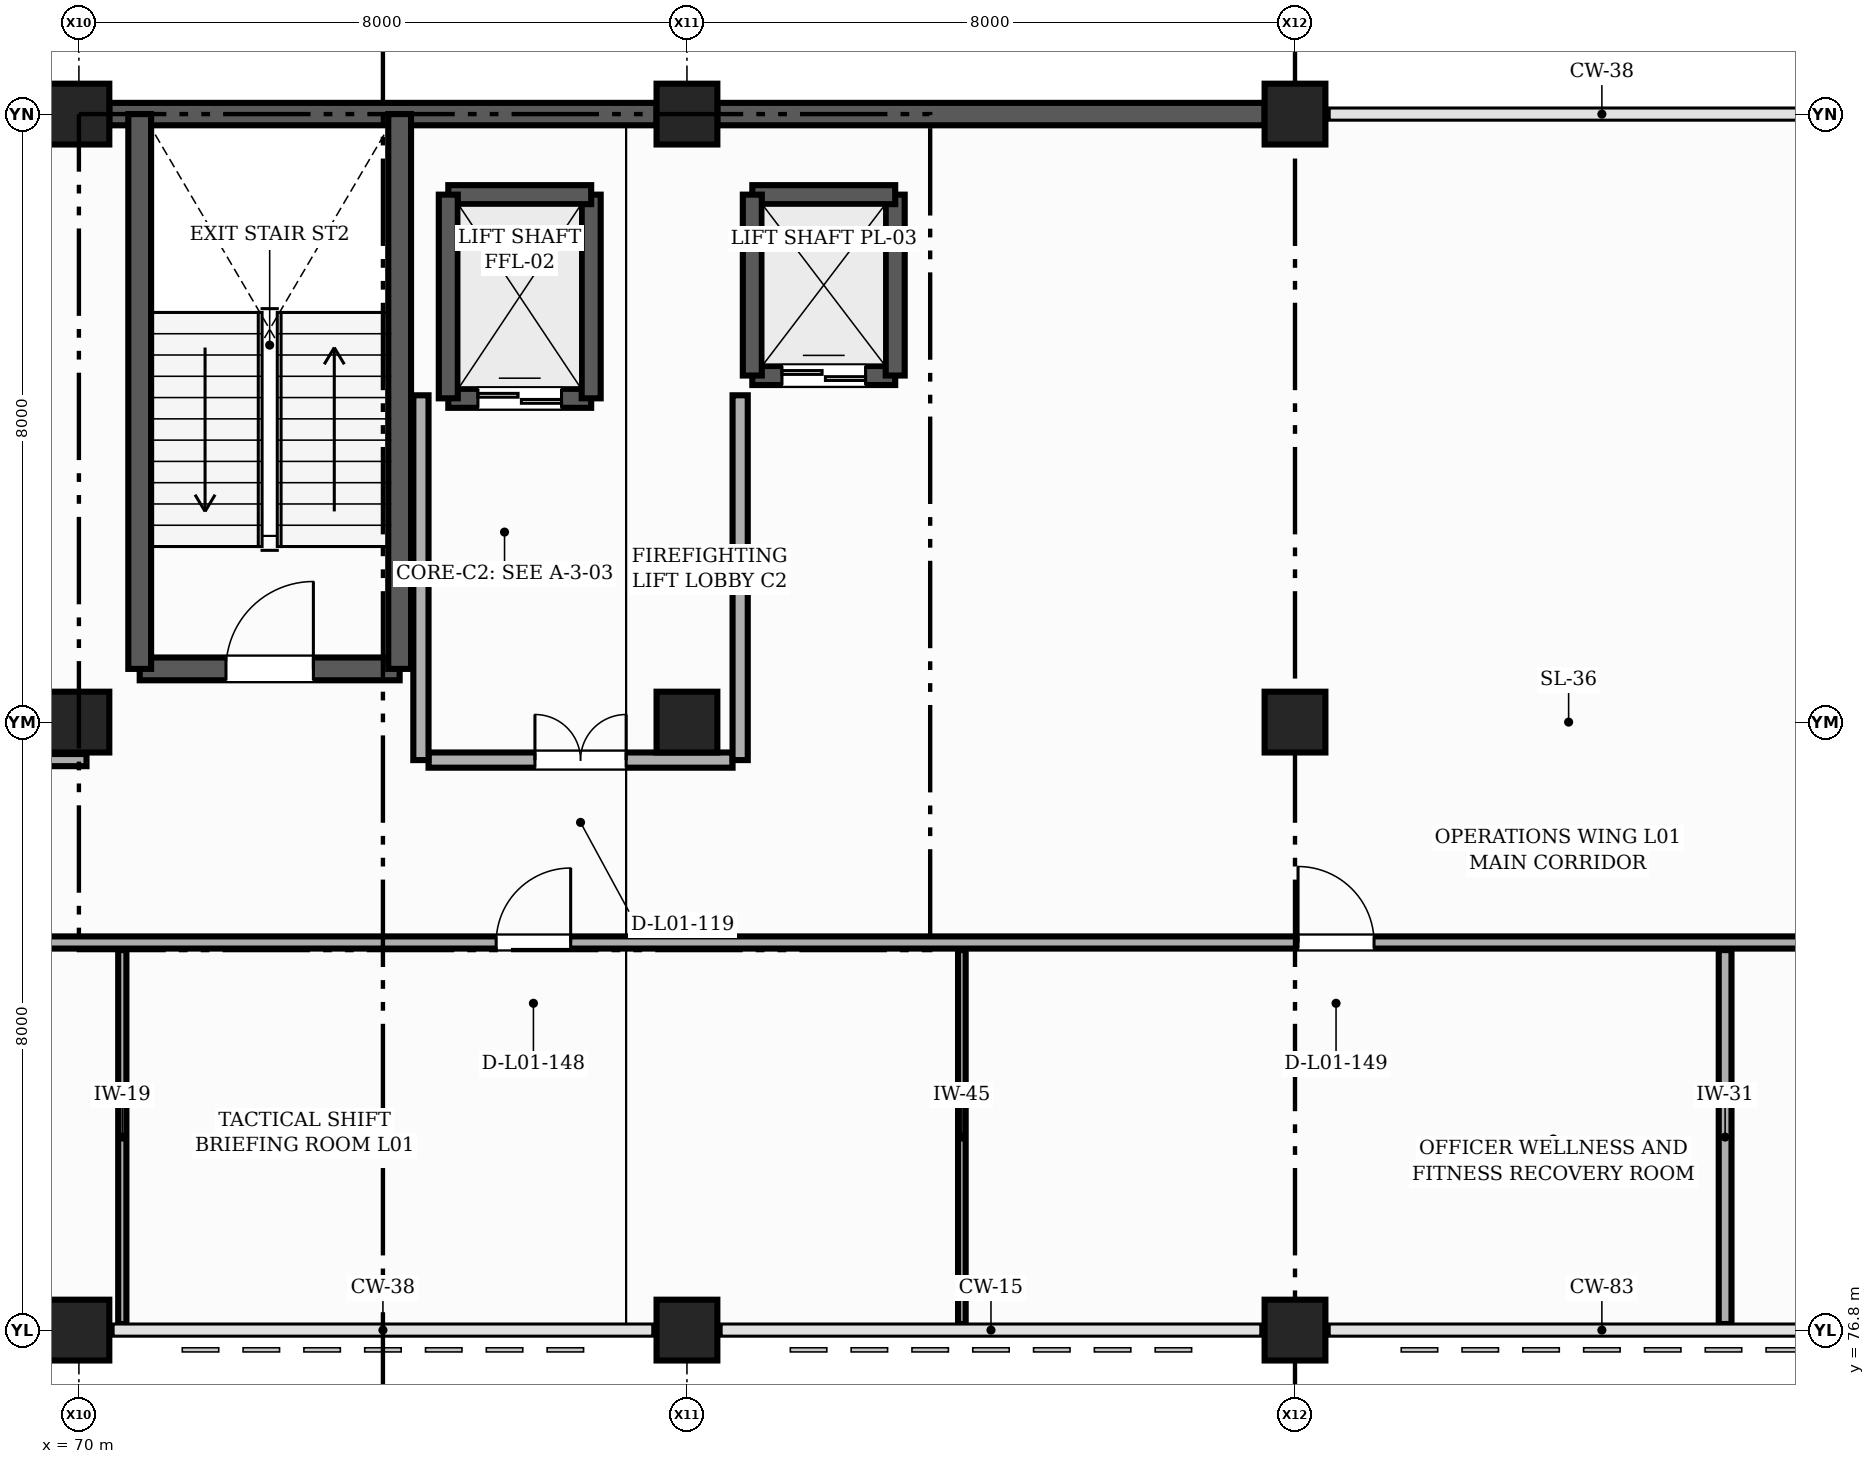
"""IFC4 building model, lengths in metres.
Left out: names, types, materials, properties, quantities, classifications, styles, units other than length and angle.
Written with IfcOpenShell. Run it as: python <this file> out.ifc"""

import sys

from ifc_helpers import new_model, si_unit, direction, frame, frame_2d, origin, origin_2d, place, context, subcontext, project, spatial, rectangle, extrude, element, fill, save


model = new_model("IFC4")
c1 = context("Model", 3, precision=1e-05, world=origin(), true_north=direction((0.0, 1.0)))
c2 = subcontext(c1, "Body", "Model", "MODEL_VIEW")
j1 = project(units=[si_unit("LENGTHUNIT", "METRE"), si_unit("PLANEANGLEUNIT", "RADIAN")], contexts=[c1])
p1 = place(None, origin())
s1 = spatial("IfcSite", under=j1, at=p1, CompositionType="ELEMENT")
p2 = place(p1, origin())
s2 = spatial("IfcBuilding", under=s1, at=p2, CompositionType="ELEMENT")
p3 = place(p2, frame((0.0, 0.0, 4.8)))
s3 = spatial("IfcBuildingStorey", under=s2, at=p3, CompositionType="ELEMENT", Elevation=4.8)
for number, where, z_axis, x_axis in (
    (1, (70.0, 76.8, 0.0), (0.0, 0.0, 1.0), (1.0, 0.0, 0.0)),
    (2, (70.0, 84.8, 0.0), (0.0, 0.0, 1.0), (1.0, 0.0, 0.0)),
    (3, (70.0, 92.8, 0.0), (0.0, 0.0, 1.0), (1.0, 0.0, 0.0)),
    (4, (78.0, 76.8, 0.0), (0.0, 0.0, 1.0), (1.0, 0.0, 0.0)),
    (5, (78.0, 84.8, 0.0), (0.0, 0.0, 1.0), (1.0, 0.0, 0.0)),
    (6, (78.0, 92.8, 0.0), (0.0, 0.0, 1.0), (1.0, 0.0, 0.0)),
    (7, (86.0, 76.8, 0.0), (0.0, 0.0, 1.0), (1.0, 0.0, 0.0)),
    (8, (86.0, 84.8, 0.0), (0.0, 0.0, 1.0), (1.0, 0.0, 0.0)),
    (9, (86.0, 92.8, 0.0), (0.0, 0.0, 1.0), (1.0, 0.0, 0.0)),
):
    element("IfcColumn", number, at=place(p3, frame(where, z_axis=z_axis, x_axis=x_axis)), inside=s3, PredefinedType="COLUMN", context=c2, shape_type="SweptSolid", body=[
        extrude(rectangle(XDim=0.8, YDim=0.8, at=origin_2d()), origin(), (0.0, 0.0, 1.0), 4.2),
    ])
p4 = place(p3, frame((85.6, 92.8, 0.0), z_axis=(0.0, 0.0, 1.0), x_axis=(-1.0, 0.0, 0.0)))
e10 = element("IfcWall", 10, at=p4, inside=s3, PredefinedType="SOLIDWALL", context=c2, shape_type="SweptSolid", body=[
    extrude(rectangle(XDim=7.2, YDim=0.295, at=frame_2d((3.6, 0.0))), origin(), (0.0, 0.0, 1.0), 3.16),
])
p5 = place(p3, frame((77.6, 92.8, 0.0), z_axis=(0.0, 0.0, 1.0), x_axis=(-1.0, 0.0, 0.0)))
e11 = element("IfcWall", 11, at=p5, inside=s3, PredefinedType="SOLIDWALL", context=c2, shape_type="SweptSolid", body=[
    extrude(rectangle(XDim=7.2, YDim=0.295, at=frame_2d((3.6, 0.0))), origin(), (0.0, 0.0, 1.0), 3.91),
])
p6 = place(p3, frame((70.8, 85.5, 0.0), z_axis=(0.0, 0.0, 1.0), x_axis=(1.0, 0.0, 0.0)))
e12 = element("IfcWall", 12, at=p6, inside=s3, PredefinedType="SHEAR", context=c2, shape_type="SweptSolid", body=[
    extrude(rectangle(XDim=3.42, YDim=0.3, at=frame_2d((1.71, 0.0))), origin(), (0.0, 0.0, 1.0), 4.2),
])
p7 = place(p6, frame((1.135, 0.0, 0.0)))
e13 = element("IfcOpeningElement", 13, at=p7, cuts=e12, PredefinedType="OPENING", context=c2, shape_type="SweptSolid", body=[
    extrude(rectangle(XDim=1.15, YDim=2.15, at=frame_2d((0.575, 1.075))), frame((0.0, 0.16, 0.0), z_axis=(0.0, -1.0, 0.0), x_axis=(1.0, 0.0, 0.0)), (0.0, 0.0, 1.0), 0.32),
])
for number, where, z_axis, x_axis in (
    (14, (74.22, 85.5, 0.0), (0.0, 0.0, 1.0), (0.0, 1.0, 0.0)),
    (15, (70.8, 92.8, 0.0), (0.0, 0.0, 1.0), (0.0, -1.0, 0.0)),
):
    element("IfcWall", number, at=place(p3, frame(where, z_axis=z_axis, x_axis=x_axis)), inside=s3, PredefinedType="SHEAR", context=c2, shape_type="SweptSolid", body=[
        extrude(rectangle(XDim=7.3, YDim=0.3, at=frame_2d((3.65, 0.0))), origin(), (0.0, 0.0, 1.0), 4.2),
    ])
p8 = place(p3, frame((74.86, 89.06, 0.0), z_axis=(0.0, 0.0, 1.0), x_axis=(1.0, 0.0, 0.0)))
e16 = element("IfcWall", 16, at=p8, inside=s3, PredefinedType="SHEAR", context=c2, shape_type="SweptSolid", body=[
    extrude(rectangle(XDim=1.88, YDim=0.25, at=frame_2d((0.94, 0.0))), origin(), (0.0, 0.0, 1.0), 4.2),
])
p9 = place(p8, frame((0.39, 0.0, 0.0)))
e17 = element("IfcOpeningElement", 17, at=p9, cuts=e16, PredefinedType="OPENING", context=c2, shape_type="SweptSolid", body=[
    extrude(rectangle(XDim=1.1, YDim=2.2, at=frame_2d((0.55, 1.1))), frame((0.0, 0.135, 0.0), z_axis=(0.0, -1.0, 0.0), x_axis=(1.0, 0.0, 0.0)), (0.0, 0.0, 1.0), 0.27),
])
p10 = place(p3, frame((76.74, 89.06, 0.0), z_axis=(0.0, 0.0, 1.0), x_axis=(0.0, 1.0, 0.0)))
e18 = element("IfcWall", 18, at=p10, inside=s3, PredefinedType="SHEAR", context=c2, shape_type="SweptSolid", body=[
    extrude(rectangle(XDim=2.68, YDim=0.25, at=frame_2d((1.34, 0.0))), origin(), (0.0, 0.0, 1.0), 4.2),
])
p11 = place(p3, frame((76.74, 91.74, 0.0), z_axis=(0.0, 0.0, 1.0), x_axis=(-1.0, 0.0, 0.0)))
e19 = element("IfcWall", 19, at=p11, inside=s3, PredefinedType="SHEAR", context=c2, shape_type="SweptSolid", body=[
    extrude(rectangle(XDim=1.88, YDim=0.25, at=frame_2d((0.94, 0.0))), origin(), (0.0, 0.0, 1.0), 4.2),
])
p12 = place(p3, frame((74.86, 91.74, 0.0), z_axis=(0.0, 0.0, 1.0), x_axis=(0.0, -1.0, 0.0)))
e20 = element("IfcWall", 20, at=p12, inside=s3, PredefinedType="SHEAR", context=c2, shape_type="SweptSolid", body=[
    extrude(rectangle(XDim=2.68, YDim=0.25, at=frame_2d((1.34, 0.0))), origin(), (0.0, 0.0, 1.0), 4.2),
])
p13 = place(p3, frame((78.86, 89.36, 0.0), z_axis=(0.0, 0.0, 1.0), x_axis=(1.0, 0.0, 0.0)))
e21 = element("IfcWall", 21, at=p13, inside=s3, PredefinedType="SHEAR", context=c2, shape_type="SweptSolid", body=[
    extrude(rectangle(XDim=1.88, YDim=0.25, at=frame_2d((0.94, 0.0))), origin(), (0.0, 0.0, 1.0), 4.2),
])
p14 = place(p13, frame((0.39, 0.0, 0.0)))
e22 = element("IfcOpeningElement", 22, at=p14, cuts=e21, PredefinedType="OPENING", context=c2, shape_type="SweptSolid", body=[
    extrude(rectangle(XDim=1.1, YDim=2.2, at=frame_2d((0.55, 1.1))), frame((0.0, 0.135, 0.0), z_axis=(0.0, -1.0, 0.0), x_axis=(1.0, 0.0, 0.0)), (0.0, 0.0, 1.0), 0.27),
])
p15 = place(p3, frame((80.74, 89.36, 0.0), z_axis=(0.0, 0.0, 1.0), x_axis=(0.0, 1.0, 0.0)))
e23 = element("IfcWall", 23, at=p15, inside=s3, PredefinedType="SHEAR", context=c2, shape_type="SweptSolid", body=[
    extrude(rectangle(XDim=2.38, YDim=0.25, at=frame_2d((1.19, 0.0))), origin(), (0.0, 0.0, 1.0), 4.2),
])
p16 = place(p3, frame((80.74, 91.74, 0.0), z_axis=(0.0, 0.0, 1.0), x_axis=(-1.0, 0.0, 0.0)))
e24 = element("IfcWall", 24, at=p16, inside=s3, PredefinedType="SHEAR", context=c2, shape_type="SweptSolid", body=[
    extrude(rectangle(XDim=1.88, YDim=0.25, at=frame_2d((0.94, 0.0))), origin(), (0.0, 0.0, 1.0), 4.2),
])
p17 = place(p3, frame((78.86, 91.74, 0.0), z_axis=(0.0, 0.0, 1.0), x_axis=(0.0, -1.0, 0.0)))
e25 = element("IfcWall", 25, at=p17, inside=s3, PredefinedType="SHEAR", context=c2, shape_type="SweptSolid", body=[
    extrude(rectangle(XDim=2.38, YDim=0.25, at=frame_2d((1.19, 0.0))), origin(), (0.0, 0.0, 1.0), 4.2),
])
p18 = place(p3, frame((74.6, 84.3, 0.0), z_axis=(0.0, 0.0, 1.0), x_axis=(1.0, 0.0, 0.0)))
e26 = element("IfcWall", 26, at=p18, inside=s3, PredefinedType="PARTITIONING", context=c2, shape_type="SweptSolid", body=[
    extrude(rectangle(XDim=4.0, YDim=0.2, at=frame_2d((2.0, 0.0))), origin(), (0.0, 0.0, 1.0), 3.195),
])
p19 = place(p18, frame((1.4, 0.0, 0.0)))
e27 = element("IfcOpeningElement", 27, at=p19, cuts=e26, PredefinedType="OPENING", context=c2, shape_type="SweptSolid", body=[
    extrude(rectangle(XDim=1.2, YDim=2.15, at=frame_2d((0.6, 1.075))), frame((0.0, 0.11, 0.0), z_axis=(0.0, -1.0, 0.0), x_axis=(1.0, 0.0, 0.0)), (0.0, 0.0, 1.0), 0.22),
])
p20 = place(p3, frame((74.5, 84.3, 0.0), z_axis=(0.0, 0.0, 1.0), x_axis=(0.0, 1.0, 0.0)))
e28 = element("IfcWall", 28, at=p20, inside=s3, PredefinedType="PARTITIONING", context=c2, shape_type="SweptSolid", body=[
    extrude(rectangle(XDim=4.8, YDim=0.2, at=frame_2d((2.4, 0.0))), origin(), (0.0, 0.0, 1.0), 3.345),
])
p21 = place(p3, frame((78.7, 84.3, 0.0), z_axis=(0.0, 0.0, 1.0), x_axis=(0.0, 1.0, 0.0)))
e29 = element("IfcWall", 29, at=p21, inside=s3, PredefinedType="PARTITIONING", context=c2, shape_type="SweptSolid", body=[
    extrude(rectangle(XDim=4.8, YDim=0.2, at=frame_2d((2.4, 0.0))), origin(), (0.0, 0.0, 1.0), 3.045),
])
p22 = place(p3, frame((70.571, 76.88, 0.0), z_axis=(0.0, 0.0, 1.0), x_axis=(0.0, 1.0, 0.0)))
e30 = element("IfcWall", 30, at=p22, inside=s3, PredefinedType="PARTITIONING", context=c2, shape_type="SweptSolid", body=[
    extrude(rectangle(XDim=4.92, YDim=0.108, at=frame_2d((2.46, 0.0))), origin(), (0.0, 0.0, 1.0), 3.145),
])
p23 = place(p3, frame((81.617, 76.88, 0.0), z_axis=(0.0, 0.0, 1.0), x_axis=(0.0, 1.0, 0.0)))
e31 = element("IfcWall", 31, at=p23, inside=s3, PredefinedType="PARTITIONING", context=c2, shape_type="SweptSolid", body=[
    extrude(rectangle(XDim=4.92, YDim=0.1, at=frame_2d((2.46, 0.0))), origin(), (0.0, 0.0, 1.0), 3.145),
])
p24 = place(p3, frame((91.659, 76.88, 0.0), z_axis=(0.0, 0.0, 1.0), x_axis=(0.0, 1.0, 0.0)))
e32 = element("IfcWall", 32, at=p24, inside=s3, PredefinedType="PARTITIONING", context=c2, shape_type="SweptSolid", body=[
    extrude(rectangle(XDim=4.92, YDim=0.168, at=frame_2d((2.46, 0.0))), origin(), (0.0, 0.0, 1.0), 3.145),
])
p25 = place(p3, frame((29.3, 81.9, 0.0), z_axis=(0.0, 0.0, 1.0), x_axis=(1.0, 0.0, 0.0)))
e33 = element("IfcWall", 33, at=p25, inside=s3, PredefinedType="PARTITIONING", context=c2, shape_type="SweptSolid", body=[
    extrude(rectangle(XDim=72.62, YDim=0.16, at=frame_2d((36.31, 0.0))), origin(), (0.0, 0.0, 1.0), 3.195),
])
p26 = place(p25, frame((7.49, 0.0, 0.0)))
e34 = element("IfcOpeningElement", 34, at=p26, cuts=e33, PredefinedType="OPENING", context=c2, shape_type="SweptSolid", body=[
    extrude(rectangle(XDim=0.9, YDim=2.1, at=frame_2d((0.45, 1.05))), frame((0.0, 0.09, 0.0), z_axis=(0.0, -1.0, 0.0), x_axis=(1.0, 0.0, 0.0)), (0.0, 0.0, 1.0), 0.18),
])
p27 = place(p25, frame((22.09, 0.0, 0.0)))
e35 = element("IfcOpeningElement", 35, at=p27, cuts=e33, PredefinedType="OPENING", context=c2, shape_type="SweptSolid", body=[
    extrude(rectangle(XDim=0.92, YDim=2.1, at=frame_2d((0.46, 1.05))), frame((0.0, 0.09, 0.0), z_axis=(0.0, -1.0, 0.0), x_axis=(1.0, 0.0, 0.0)), (0.0, 0.0, 1.0), 0.18),
])
p28 = place(p25, frame((34.65, 0.0, 0.0)))
e36 = element("IfcOpeningElement", 36, at=p28, cuts=e33, PredefinedType="OPENING", context=c2, shape_type="SweptSolid", body=[
    extrude(rectangle(XDim=0.95, YDim=2.1, at=frame_2d((0.475, 1.05))), frame((0.0, 0.09, 0.0), z_axis=(0.0, -1.0, 0.0), x_axis=(1.0, 0.0, 0.0)), (0.0, 0.0, 1.0), 0.18),
])
p29 = place(p25, frame((46.19, 0.0, 0.0)))
e37 = element("IfcOpeningElement", 37, at=p29, cuts=e33, PredefinedType="OPENING", context=c2, shape_type="SweptSolid", body=[
    extrude(rectangle(XDim=0.98, YDim=2.12, at=frame_2d((0.49, 1.06))), frame((0.0, 0.09, 0.0), z_axis=(0.0, -1.0, 0.0), x_axis=(1.0, 0.0, 0.0)), (0.0, 0.0, 1.0), 0.18),
])
p30 = place(p25, frame((56.74, 0.0, 0.0)))
e38 = element("IfcOpeningElement", 38, at=p30, cuts=e33, PredefinedType="OPENING", context=c2, shape_type="SweptSolid", body=[
    extrude(rectangle(XDim=1.0, YDim=2.1, at=frame_2d((0.5, 1.05))), frame((0.0, 0.09, 0.0), z_axis=(0.0, -1.0, 0.0), x_axis=(1.0, 0.0, 0.0)), (0.0, 0.0, 1.0), 0.18),
])
p31 = place(p25, frame((66.82, 0.0, 0.0)))
e39 = element("IfcOpeningElement", 39, at=p31, cuts=e33, PredefinedType="OPENING", context=c2, shape_type="SweptSolid", body=[
    extrude(rectangle(XDim=1.02, YDim=2.12, at=frame_2d((0.51, 1.06))), frame((0.0, 0.09, 0.0), z_axis=(0.0, -1.0, 0.0), x_axis=(1.0, 0.0, 0.0)), (0.0, 0.0, 1.0), 0.18),
])
p32 = place(p3, frame((34.7, 84.3, 0.0), z_axis=(0.0, 0.0, 1.0), x_axis=(1.0, 0.0, 0.0)))
e40 = element("IfcWall", 40, at=p32, inside=s3, PredefinedType="PARTITIONING", context=c2, shape_type="SweptSolid", body=[
    extrude(rectangle(XDim=35.4, YDim=0.16, at=frame_2d((17.7, 0.0))), origin(), (0.0, 0.0, 1.0), 3.195),
])
p33 = place(p32, frame((5.92, 0.0, 0.0)))
e41 = element("IfcOpeningElement", 41, at=p33, cuts=e40, PredefinedType="OPENING", context=c2, shape_type="SweptSolid", body=[
    extrude(rectangle(XDim=1.05, YDim=2.1, at=frame_2d((0.525, 1.05))), frame((0.0, 0.09, 0.0), z_axis=(0.0, -1.0, 0.0), x_axis=(1.0, 0.0, 0.0)), (0.0, 0.0, 1.0), 0.18),
])
p34 = place(p32, frame((17.2, 0.0, 0.0)))
e42 = element("IfcOpeningElement", 42, at=p34, cuts=e40, PredefinedType="OPENING", context=c2, shape_type="SweptSolid", body=[
    extrude(rectangle(XDim=0.95, YDim=2.15, at=frame_2d((0.475, 1.075))), frame((0.0, 0.09, 0.0), z_axis=(0.0, -1.0, 0.0), x_axis=(1.0, 0.0, 0.0)), (0.0, 0.0, 1.0), 0.18),
])
p35 = place(p32, frame((28.48, 0.0, 0.0)))
e43 = element("IfcOpeningElement", 43, at=p35, cuts=e40, PredefinedType="OPENING", context=c2, shape_type="SweptSolid", body=[
    extrude(rectangle(XDim=1.1, YDim=2.1, at=frame_2d((0.55, 1.05))), frame((0.0, 0.09, 0.0), z_axis=(0.0, -1.0, 0.0), x_axis=(1.0, 0.0, 0.0)), (0.0, 0.0, 1.0), 0.18),
])
p36 = place(p7, origin())
e44 = element("IfcDoor", 44, at=p36, inside=s3, OperationType="SINGLE_SWING_RIGHT", PredefinedType="DOOR", context=c2, shape_type="SweptSolid", body=[
    extrude(rectangle(XDim=1.15, YDim=2.15, at=frame_2d((0.575, 1.075))), frame((0.0, 0.025, 0.0), z_axis=(0.0, -1.0, 0.0), x_axis=(1.0, 0.0, 0.0)), (0.0, 0.0, 1.0), 0.05),
])
fill(e13, e44)
p37 = place(p9, origin())
e45 = element("IfcDoor", 45, at=p37, inside=s3, OperationType="DOUBLE_DOOR_SLIDING", PredefinedType="DOOR", context=c2, shape_type="SweptSolid", body=[
    extrude(rectangle(XDim=1.1, YDim=2.2, at=frame_2d((0.55, 1.1))), frame((0.0, 0.025, 0.0), z_axis=(0.0, -1.0, 0.0), x_axis=(1.0, 0.0, 0.0)), (0.0, 0.0, 1.0), 0.05),
])
fill(e17, e45)
p38 = place(p14, origin())
e46 = element("IfcDoor", 46, at=p38, inside=s3, OperationType="DOUBLE_DOOR_SLIDING", PredefinedType="DOOR", context=c2, shape_type="SweptSolid", body=[
    extrude(rectangle(XDim=1.1, YDim=2.2, at=frame_2d((0.55, 1.1))), frame((0.0, 0.025, 0.0), z_axis=(0.0, -1.0, 0.0), x_axis=(1.0, 0.0, 0.0)), (0.0, 0.0, 1.0), 0.05),
])
fill(e22, e46)
p39 = place(p19, origin())
e47 = element("IfcDoor", 47, at=p39, inside=s3, OperationType="DOUBLE_DOOR_SINGLE_SWING", PredefinedType="DOOR", context=c2, shape_type="SweptSolid", body=[
    extrude(rectangle(XDim=1.2, YDim=2.15, at=frame_2d((0.6, 1.075))), frame((0.0, 0.025, 0.0), z_axis=(0.0, -1.0, 0.0), x_axis=(1.0, 0.0, 0.0)), (0.0, 0.0, 1.0), 0.05),
])
fill(e27, e47)
p40 = place(p29, origin())
e48 = element("IfcDoor", 48, at=p40, inside=s3, OperationType="SINGLE_SWING_RIGHT", PredefinedType="DOOR", context=c2, shape_type="SweptSolid", body=[
    extrude(rectangle(XDim=0.98, YDim=2.12, at=frame_2d((0.49, 1.06))), frame((0.0, 0.025, 0.0), z_axis=(0.0, -1.0, 0.0), x_axis=(1.0, 0.0, 0.0)), (0.0, 0.0, 1.0), 0.05),
])
fill(e37, e48)
p41 = place(p30, origin())
e49 = element("IfcDoor", 49, at=p41, inside=s3, OperationType="SINGLE_SWING_LEFT", PredefinedType="DOOR", context=c2, shape_type="SweptSolid", body=[
    extrude(rectangle(XDim=1.0, YDim=2.1, at=frame_2d((0.5, 1.05))), frame((0.0, 0.025, 0.0), z_axis=(0.0, -1.0, 0.0), x_axis=(1.0, 0.0, 0.0)), (0.0, 0.0, 1.0), 0.05),
])
fill(e38, e49)
save(model, sys.argv[1])
